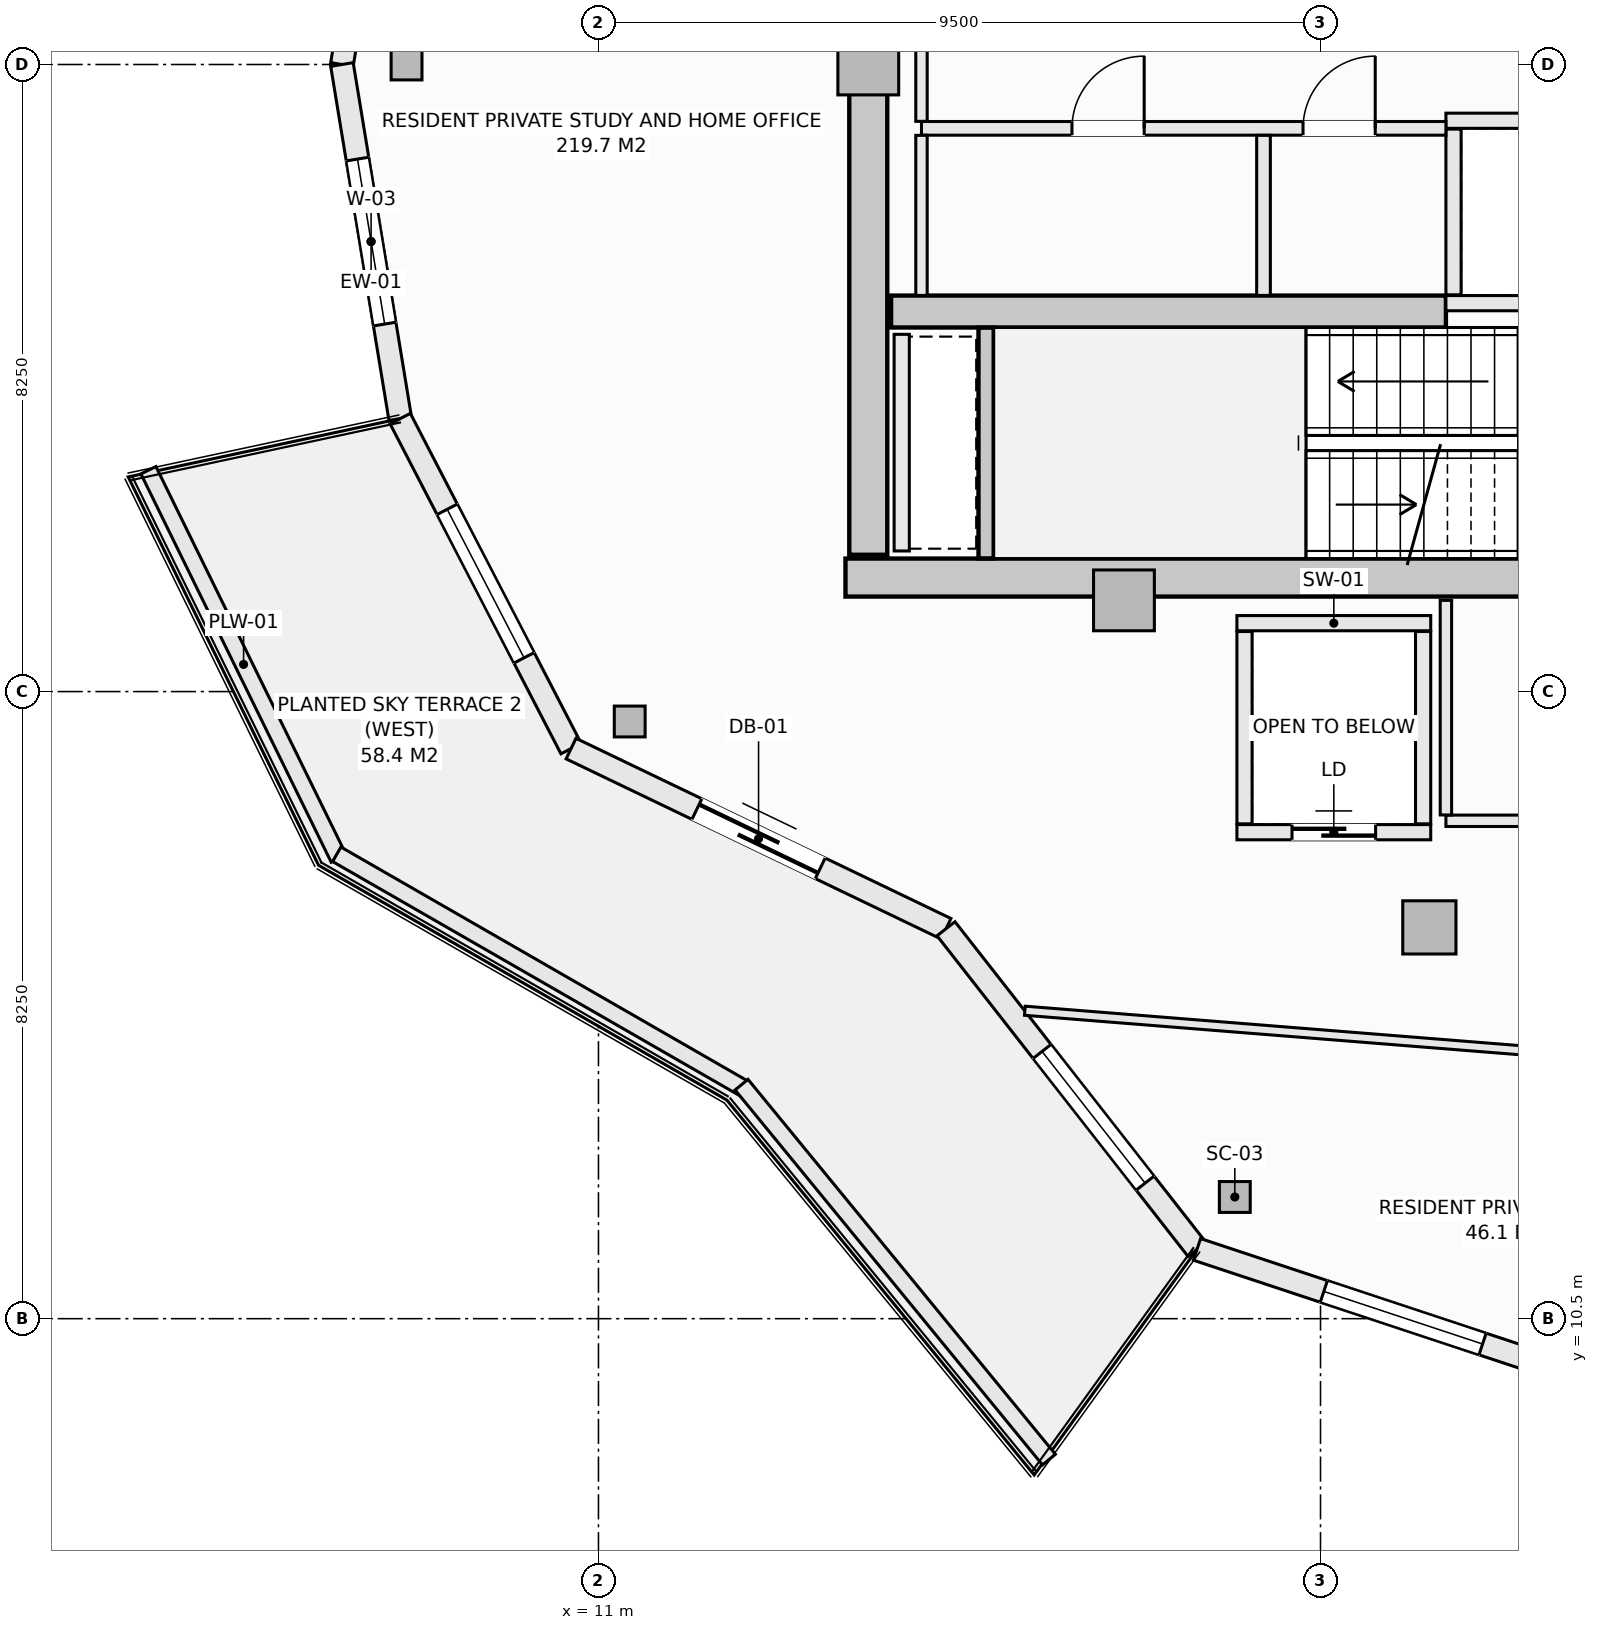
"""IFC4 building model, lengths in metres.
Left out: names, types, materials, properties, quantities, classifications, styles, units other than length and angle.
Written with IfcOpenShell. Run it as: python <this file> out.ifc"""

import sys

from ifc_helpers import new_model, si_unit, direction, frame, frame_2d, origin, origin_2d, place, context, subcontext, project, spatial, rectangle, hollow_rectangle, extrude, element, fill, save


model = new_model("IFC4")
c1 = context("Model", 3, precision=1e-05, world=origin(), true_north=direction((0.0, 1.0)))
c2 = subcontext(c1, "Body", "Model", "MODEL_VIEW")
j1 = project(units=[si_unit("LENGTHUNIT", "METRE"), si_unit("PLANEANGLEUNIT", "RADIAN")], contexts=[c1])
p1 = place(None, origin())
s1 = spatial("IfcSite", under=j1, at=p1, CompositionType="ELEMENT")
p2 = place(p1, origin())
s2 = spatial("IfcBuilding", under=s1, at=p2, CompositionType="ELEMENT")
p3 = place(p2, frame((0.0, 0.0, 239.3)))
s3 = spatial("IfcBuildingStorey", under=s2, at=p3, CompositionType="ELEMENT", Elevation=239.3)
p4 = place(p3, frame((14.25, 20.25, -0.27), z_axis=(0.0, 0.0, 1.0), x_axis=(1.0, 0.0, 0.0)))
e1 = element("IfcWall", 1, at=p4, inside=s3, PredefinedType="SHEAR", context=c2, shape_type="SweptSolid", body=[
    extrude(rectangle(XDim=13.5, YDim=0.5, at=frame_2d((6.75, 0.0))), origin(), (0.0, 0.0, 1.0), 3.3),
])
p5 = place(p3, frame((14.55, 20.55, -0.27), z_axis=(0.0, 0.0, 1.0), x_axis=(0.0, 1.0, 0.0)))
e2 = element("IfcWall", 2, at=p5, inside=s3, PredefinedType="SHEAR", context=c2, shape_type="SweptSolid", body=[
    extrude(rectangle(XDim=12.9, YDim=0.5, at=frame_2d((6.45, 0.0))), origin(), (0.0, 0.0, 1.0), 3.3),
])
p6 = place(p3, frame((14.85, 23.75, -0.27), z_axis=(0.0, 0.0, 1.0), x_axis=(1.0, 0.0, 0.0)))
e3 = element("IfcWall", 3, at=p6, inside=s3, PredefinedType="SHEAR", context=c2, shape_type="SweptSolid", body=[
    extrude(rectangle(XDim=7.3, YDim=0.42, at=frame_2d((3.65, 0.0))), origin(), (0.0, 0.0, 1.0), 3.3),
])
for number, where, z_axis, x_axis in (
    (4, (8.475, 27.0, -0.27), (0.0, 0.0, 1.0), (1.0, 0.0, 0.0)),
    (5, (11.411, 18.356, -0.27), (0.0, 0.0, 1.0), (1.0, 0.0, 0.0)),
    (6, (19.372, 12.101, -0.27), (0.0, 0.0, 1.0), (1.0, 0.0, 0.0)),
):
    element("IfcColumn", number, at=place(p3, frame(where, z_axis=z_axis, x_axis=x_axis)), inside=s3, PredefinedType="COLUMN", context=c2, shape_type="SweptSolid", body=[
        extrude(hollow_rectangle(XDim=0.406, YDim=0.406, WallThickness=0.016, at=origin_2d()), origin(), (0.0, 0.0, 1.0), 3.3),
    ])
p7 = place(p3, frame((21.932, 15.648, -0.27), z_axis=(0.0, 0.0, 1.0), x_axis=(1.0, 0.0, 0.0)))
e7 = element("IfcColumn", 7, at=p7, inside=s3, PredefinedType="COLUMN", context=c2, shape_type="SweptSolid", body=[
    extrude(rectangle(XDim=0.7, YDim=0.7, at=origin_2d()), origin(), (0.0, 0.0, 1.0), 3.3),
])
for number, where, z_axis, x_axis in (
    (8, (14.55, 27.0, -0.27), (0.0, 0.0, 1.0), (1.0, 0.0, 0.0)),
    (9, (17.914, 19.95, -0.27), (0.0, 0.0, 1.0), (1.0, 0.0, 0.0)),
):
    element("IfcColumn", number, at=place(p3, frame(where, z_axis=z_axis, x_axis=x_axis)), inside=s3, PredefinedType="PILASTER", context=c2, shape_type="SweptSolid", body=[
        extrude(rectangle(XDim=0.8, YDim=0.8, at=origin_2d()), origin(), (0.0, 0.0, 1.0), 3.3),
    ])
p8 = place(p3, frame((7.625, 27.0, 0.0), z_axis=(0.0, 0.0, 1.0), x_axis=(0.162369371657, 0.986730047758, 0.0)))
e10 = element("IfcWall", 10, at=p8, inside=s3, PredefinedType="SOLIDWALL", context=c2, shape_type="SweptSolid", body=[
    extrude(rectangle(XDim=4.721, YDim=0.3, at=frame_2d((2.361, 0.0))), origin(), (0.0, 0.0, 1.0), 2.605),
])
p9 = place(p8, frame((1.261, 0.0, 0.72)))
e11 = element("IfcOpeningElement", 11, at=p9, cuts=e10, PredefinedType="OPENING", context=c2, shape_type="SweptSolid", body=[
    extrude(rectangle(XDim=2.2, YDim=1.65, at=frame_2d((1.1, 0.825))), frame((0.0, 0.16, 0.0), z_axis=(0.0, -1.0, 0.0), x_axis=(1.0, 0.0, 0.0)), (0.0, 0.0, 1.0), 0.32),
])
p10 = place(p3, frame((7.625, 27.0, 0.0), z_axis=(0.0, 0.0, 1.0), x_axis=(0.162369371657, -0.986730047758, 0.0)))
e12 = element("IfcWall", 12, at=p10, inside=s3, PredefinedType="SOLIDWALL", context=c2, shape_type="SweptSolid", body=[
    extrude(rectangle(XDim=4.721, YDim=0.3, at=frame_2d((2.361, 0.0))), origin(), (0.0, 0.0, 1.0), 2.605),
])
p11 = place(p10, frame((1.261, 0.0, 0.72)))
e13 = element("IfcOpeningElement", 13, at=p11, cuts=e12, PredefinedType="OPENING", context=c2, shape_type="SweptSolid", body=[
    extrude(rectangle(XDim=2.2, YDim=1.65, at=frame_2d((1.1, 0.825))), frame((0.0, 0.16, 0.0), z_axis=(0.0, -1.0, 0.0), x_axis=(1.0, 0.0, 0.0)), (0.0, 0.0, 1.0), 0.32),
])
p12 = place(p3, frame((8.392, 22.341, 0.0), z_axis=(0.0, 0.0, 1.0), x_axis=(0.459793771602, -0.888025724625, 0.0)))
e14 = element("IfcWall", 14, at=p12, inside=s3, PredefinedType="SOLIDWALL", context=c2, shape_type="SweptSolid", body=[
    extrude(rectangle(XDim=4.889, YDim=0.3, at=frame_2d((2.444, 0.0))), origin(), (0.0, 0.0, 1.0), 2.605),
])
p13 = place(p12, frame((1.344, 0.0, 0.72)))
e15 = element("IfcOpeningElement", 15, at=p13, cuts=e14, PredefinedType="OPENING", context=c2, shape_type="SweptSolid", body=[
    extrude(rectangle(XDim=2.2, YDim=1.65, at=frame_2d((1.1, 0.825))), frame((0.0, 0.16, 0.0), z_axis=(0.0, -1.0, 0.0), x_axis=(1.0, 0.0, 0.0)), (0.0, 0.0, 1.0), 0.32),
])
p14 = place(p3, frame((10.639, 18.0, 0.0), z_axis=(0.0, 0.0, 1.0), x_axis=(0.901355238351, -0.433080517106, 0.0)))
e16 = element("IfcWall", 16, at=p14, inside=s3, PredefinedType="SOLIDWALL", context=c2, shape_type="SweptSolid", body=[
    extrude(rectangle(XDim=5.473, YDim=0.3, at=frame_2d((2.737, 0.0))), origin(), (0.0, 0.0, 1.0), 2.605),
])
p15 = place(p14, frame((1.837, 0.0, 0.0)))
e17 = element("IfcOpeningElement", 17, at=p15, cuts=e16, PredefinedType="OPENING", context=c2, shape_type="SweptSolid", body=[
    extrude(rectangle(XDim=1.8, YDim=2.25, at=frame_2d((0.9, 1.125))), frame((0.0, 0.16, 0.0), z_axis=(0.0, -1.0, 0.0), x_axis=(1.0, 0.0, 0.0)), (0.0, 0.0, 1.0), 0.32),
])
p16 = place(p3, frame((15.573, 15.63, 0.0), z_axis=(0.0, 0.0, 1.0), x_axis=(0.61644588519, -0.787397276241, 0.0)))
e18 = element("IfcWall", 18, at=p16, inside=s3, PredefinedType="SOLIDWALL", context=c2, shape_type="SweptSolid", body=[
    extrude(rectangle(XDim=5.357, YDim=0.3, at=frame_2d((2.678, 0.0))), origin(), (0.0, 0.0, 1.0), 2.605),
])
p17 = place(p16, frame((2.05, 0.0, 0.72)))
e19 = element("IfcOpeningElement", 19, at=p17, cuts=e18, PredefinedType="OPENING", context=c2, shape_type="SweptSolid", body=[
    extrude(rectangle(XDim=2.2, YDim=1.65, at=frame_2d((1.1, 0.825))), frame((0.0, 0.16, 0.0), z_axis=(0.0, -1.0, 0.0), x_axis=(1.0, 0.0, 0.0)), (0.0, 0.0, 1.0), 0.32),
])
p18 = place(p3, frame((18.875, 11.412, 0.0), z_axis=(0.0, 0.0, 1.0), x_axis=(0.949232769585, -0.314574552605, 0.0)))
e20 = element("IfcWall", 20, at=p18, inside=s3, PredefinedType="SOLIDWALL", context=c2, shape_type="SweptSolid", body=[
    extrude(rectangle(XDim=5.717, YDim=0.3, at=frame_2d((2.858, 0.0))), origin(), (0.0, 0.0, 1.0), 2.605),
])
p19 = place(p18, frame((1.758, 0.0, 0.72)))
e21 = element("IfcOpeningElement", 21, at=p19, cuts=e20, PredefinedType="OPENING", context=c2, shape_type="SweptSolid", body=[
    extrude(rectangle(XDim=2.2, YDim=1.65, at=frame_2d((1.1, 0.825))), frame((0.0, 0.16, 0.0), z_axis=(0.0, -1.0, 0.0), x_axis=(1.0, 0.0, 0.0)), (0.0, 0.0, 1.0), 0.32),
])
p20 = place(p3, frame((5.079, 21.662, 0.0), z_axis=(0.0, 0.0, 1.0), x_axis=(0.440058847499, -0.897968936399, 0.0)))
e22 = element("IfcWall", 22, at=p20, inside=s3, PredefinedType="PARAPET", context=c2, shape_type="SweptSolid", body=[
    extrude(rectangle(XDim=5.689, YDim=0.22, at=frame_2d((2.845, 0.0))), origin(), (0.0, 0.0, 1.0), 0.52),
])
p21 = place(p3, frame((7.557, 16.609, 0.0), z_axis=(0.0, 0.0, 1.0), x_axis=(0.866901621005, -0.49847926687, 0.0)))
e23 = element("IfcWall", 23, at=p21, inside=s3, PredefinedType="PARAPET", context=c2, shape_type="SweptSolid", body=[
    extrude(rectangle(XDim=6.197, YDim=0.22, at=frame_2d((3.098, 0.0))), origin(), (0.0, 0.0, 1.0), 0.52),
])
p22 = place(p3, frame((12.882, 13.579, 0.0), z_axis=(0.0, 0.0, 1.0), x_axis=(0.63407318032, -0.77327304492, 0.0)))
e24 = element("IfcWall", 24, at=p22, inside=s3, PredefinedType="PARAPET", context=c2, shape_type="SweptSolid", body=[
    extrude(rectangle(XDim=6.379, YDim=0.22, at=frame_2d((3.189, 0.0))), origin(), (0.0, 0.0, 1.0), 0.52),
])
p23 = place(p3, frame((16.1, 20.502, -0.27), z_axis=(0.0, 0.0, 1.0), x_axis=(0.0, 1.0, 0.0)))
e25 = element("IfcWall", 25, at=p23, inside=s3, PredefinedType="SHEAR", context=c2, shape_type="SweptSolid", body=[
    extrude(rectangle(XDim=3.036, YDim=0.2, at=frame_2d((1.518, 0.0))), origin(), (0.0, 0.0, 1.0), 3.3),
])
for number, where, z_axis, x_axis in (
    (26, (22.15, 26.26, 0.0), (0.0, 0.0, 1.0), (1.0, 0.0, 0.0)),
    (27, (22.15, 23.86, 0.0), (0.0, 0.0, 1.0), (1.0, 0.0, 0.0)),
):
    element("IfcWall", number, at=place(p3, frame(where, z_axis=z_axis, x_axis=x_axis)), inside=s3, PredefinedType="SOLIDWALL", context=c2, shape_type="SweptSolid", body=[
        extrude(rectangle(XDim=2.45, YDim=0.2, at=frame_2d((1.225, 0.0))), origin(), (0.0, 0.0, 1.0), 3.03),
    ])
p24 = place(p3, frame((22.25, 23.97, 0.0), z_axis=(0.0, 0.0, 1.0), x_axis=(0.0, 1.0, 0.0)))
e28 = element("IfcWall", 28, at=p24, inside=s3, PredefinedType="SOLIDWALL", context=c2, shape_type="SweptSolid", body=[
    extrude(rectangle(XDim=2.18, YDim=0.2, at=frame_2d((1.09, 0.0))), origin(), (0.0, 0.0, 1.0), 3.03),
])
p25 = place(p3, frame((19.4, 19.65, 0.0), z_axis=(0.0, 0.0, 1.0), x_axis=(1.0, 0.0, 0.0)))
e29 = element("IfcWall", 29, at=p25, inside=s3, PredefinedType="SOLIDWALL", context=c2, shape_type="SweptSolid", body=[
    extrude(rectangle(XDim=2.55, YDim=0.2, at=frame_2d((1.275, 0.0))), origin(), (0.0, 0.0, 1.0), 3.03),
])
p26 = place(p3, frame((19.4, 16.9, 0.0), z_axis=(0.0, 0.0, 1.0), x_axis=(1.0, 0.0, 0.0)))
e30 = element("IfcWall", 30, at=p26, inside=s3, PredefinedType="SOLIDWALL", context=c2, shape_type="SweptSolid", body=[
    extrude(rectangle(XDim=2.55, YDim=0.2, at=frame_2d((1.275, 0.0))), origin(), (0.0, 0.0, 1.0), 3.03),
])
p27 = place(p26, frame((0.725, 0.0, 0.0)))
e31 = element("IfcOpeningElement", 31, at=p27, cuts=e30, PredefinedType="OPENING", context=c2, shape_type="SweptSolid", body=[
    extrude(rectangle(XDim=1.1, YDim=2.2, at=frame_2d((0.55, 1.1))), frame((0.0, 0.11, 0.0), z_axis=(0.0, -1.0, 0.0), x_axis=(1.0, 0.0, 0.0)), (0.0, 0.0, 1.0), 0.22),
])
for number, where, z_axis, x_axis in (
    (32, (19.5, 17.01, 0.0), (0.0, 0.0, 1.0), (0.0, 1.0, 0.0)),
    (33, (21.85, 17.01, 0.0), (0.0, 0.0, 1.0), (0.0, 1.0, 0.0)),
):
    element("IfcWall", number, at=place(p3, frame(where, z_axis=z_axis, x_axis=x_axis)), inside=s3, PredefinedType="SOLIDWALL", context=c2, shape_type="SweptSolid", body=[
        extrude(rectangle(XDim=2.53, YDim=0.2, at=frame_2d((1.265, 0.0))), origin(), (0.0, 0.0, 1.0), 3.03),
    ])
p28 = place(p3, frame((14.99, 20.6, 0.0), z_axis=(0.0, 0.0, 1.0), x_axis=(0.0, 1.0, 0.0)))
e34 = element("IfcWall", 34, at=p28, inside=s3, PredefinedType="SOLIDWALL", context=c2, shape_type="SweptSolid", body=[
    extrude(rectangle(XDim=2.85, YDim=0.2, at=frame_2d((1.425, 0.0))), origin(), (0.0, 0.0, 1.0), 3.03),
])
p29 = place(p3, frame((15.25, 26.16, 0.0), z_axis=(0.0, 0.0, 1.0), x_axis=(1.0, 0.0, 0.0)))
e35 = element("IfcWall", 35, at=p29, inside=s3, PredefinedType="SOLIDWALL", context=c2, shape_type="SweptSolid", body=[
    extrude(rectangle(XDim=6.9, YDim=0.18, at=frame_2d((3.45, 0.0))), origin(), (0.0, 0.0, 1.0), 3.03),
])
p30 = place(p29, frame((5.02, 0.0, 0.0)))
e36 = element("IfcOpeningElement", 36, at=p30, cuts=e35, PredefinedType="OPENING", context=c2, shape_type="SweptSolid", body=[
    extrude(rectangle(XDim=0.95, YDim=2.1, at=frame_2d((0.475, 1.05))), frame((0.0, 0.1, 0.0), z_axis=(0.0, -1.0, 0.0), x_axis=(1.0, 0.0, 0.0)), (0.0, 0.0, 1.0), 0.2),
])
p31 = place(p29, frame((1.98, 0.0, 0.0)))
e37 = element("IfcOpeningElement", 37, at=p31, cuts=e35, PredefinedType="OPENING", context=c2, shape_type="SweptSolid", body=[
    extrude(rectangle(XDim=0.95, YDim=2.1, at=frame_2d((0.475, 1.05))), frame((0.0, 0.1, 0.0), z_axis=(0.0, -1.0, 0.0), x_axis=(1.0, 0.0, 0.0)), (0.0, 0.0, 1.0), 0.2),
])
p32 = place(p3, frame((15.25, 23.962, 0.0), z_axis=(0.0, 0.0, 1.0), x_axis=(0.0, 1.0, 0.0)))
e38 = element("IfcWall", 38, at=p32, inside=s3, PredefinedType="PARTITIONING", context=c2, shape_type="SweptSolid", body=[
    extrude(rectangle(XDim=2.106, YDim=0.15, at=frame_2d((1.053, 0.0))), origin(), (0.0, 0.0, 1.0), 3.03),
])
p33 = place(p3, frame((15.25, 26.252, 0.0), z_axis=(0.0, 0.0, 1.0), x_axis=(0.0, 1.0, 0.0)))
e39 = element("IfcWall", 39, at=p33, inside=s3, PredefinedType="PARTITIONING", context=c2, shape_type="SweptSolid", body=[
    extrude(rectangle(XDim=1.496, YDim=0.15, at=frame_2d((0.748, 0.0))), origin(), (0.0, 0.0, 1.0), 3.03),
])
p34 = place(p3, frame((19.75, 23.962, 0.0), z_axis=(0.0, 0.0, 1.0), x_axis=(0.0, 1.0, 0.0)))
e40 = element("IfcWall", 40, at=p34, inside=s3, PredefinedType="SOLIDWALL", context=c2, shape_type="SweptSolid", body=[
    extrude(rectangle(XDim=2.106, YDim=0.18, at=frame_2d((1.053, 0.0))), origin(), (0.0, 0.0, 1.0), 3.03),
])
p35 = place(p3, frame((22.15, 17.05, 0.0), z_axis=(0.0, 0.0, 1.0), x_axis=(1.0, 0.0, 0.0)))
e41 = element("IfcWall", 41, at=p35, inside=s3, PredefinedType="PARTITIONING", context=c2, shape_type="SweptSolid", body=[
    extrude(rectangle(XDim=5.0, YDim=0.15, at=frame_2d((2.5, 0.0))), origin(), (0.0, 0.0, 1.0), 3.03),
])
p36 = place(p3, frame((22.15, 17.127, 0.0), z_axis=(0.0, 0.0, 1.0), x_axis=(0.0, 1.0, 0.0)))
e42 = element("IfcWall", 42, at=p36, inside=s3, PredefinedType="PARTITIONING", context=c2, shape_type="SweptSolid", body=[
    extrude(rectangle(XDim=2.823, YDim=0.15, at=frame_2d((1.412, 0.0))), origin(), (0.0, 0.0, 1.0), 3.03),
])
p37 = place(p3, frame((16.61, 14.551, 0.0), z_axis=(0.0, 0.0, 1.0), x_axis=(0.996836469487, -0.079479891176, 0.0)))
e43 = element("IfcWall", 43, at=p37, inside=s3, PredefinedType="PARTITIONING", context=c2, shape_type="SweptSolid", body=[
    extrude(rectangle(XDim=10.496, YDim=0.12, at=frame_2d((5.248, 0.0))), origin(), (0.0, 0.0, 1.0), 3.03),
])
p38 = place(p11, origin())
e44 = element("IfcWindow", 44, at=p38, inside=s3, PartitioningType="SINGLE_PANEL", PredefinedType="WINDOW", context=c2, shape_type="SweptSolid", body=[
    extrude(rectangle(XDim=2.2, YDim=1.65, at=frame_2d((1.1, 0.825))), frame((0.0, 0.03, 0.0), z_axis=(0.0, -1.0, 0.0), x_axis=(1.0, 0.0, 0.0)), (0.0, 0.0, 1.0), 0.06),
])
fill(e13, e44)
p39 = place(p13, origin())
e45 = element("IfcWindow", 45, at=p39, inside=s3, PartitioningType="SINGLE_PANEL", PredefinedType="WINDOW", context=c2, shape_type="SweptSolid", body=[
    extrude(rectangle(XDim=2.2, YDim=1.65, at=frame_2d((1.1, 0.825))), frame((0.0, 0.03, 0.0), z_axis=(0.0, -1.0, 0.0), x_axis=(1.0, 0.0, 0.0)), (0.0, 0.0, 1.0), 0.06),
])
fill(e15, e45)
p40 = place(p15, frame((1.8, 0.0, 0.0), z_axis=(0.0, 0.0, 1.0), x_axis=(-1.0, 0.0, 0.0)))
e46 = element("IfcDoor", 46, at=p40, inside=s3, OperationType="SLIDING_TO_LEFT", PredefinedType="DOOR", context=c2, shape_type="SweptSolid", body=[
    extrude(rectangle(XDim=1.8, YDim=2.25, at=frame_2d((0.9, 1.125))), frame((0.0, 0.025, 0.0), z_axis=(0.0, -1.0, 0.0), x_axis=(1.0, 0.0, 0.0)), (0.0, 0.0, 1.0), 0.05),
])
fill(e17, e46)
p41 = place(p17, origin())
e47 = element("IfcWindow", 47, at=p41, inside=s3, PartitioningType="SINGLE_PANEL", PredefinedType="WINDOW", context=c2, shape_type="SweptSolid", body=[
    extrude(rectangle(XDim=2.2, YDim=1.65, at=frame_2d((1.1, 0.825))), frame((0.0, 0.03, 0.0), z_axis=(0.0, -1.0, 0.0), x_axis=(1.0, 0.0, 0.0)), (0.0, 0.0, 1.0), 0.06),
])
fill(e19, e47)
p42 = place(p19, origin())
e48 = element("IfcWindow", 48, at=p42, inside=s3, PartitioningType="SINGLE_PANEL", PredefinedType="WINDOW", context=c2, shape_type="SweptSolid", body=[
    extrude(rectangle(XDim=2.2, YDim=1.65, at=frame_2d((1.1, 0.825))), frame((0.0, 0.03, 0.0), z_axis=(0.0, -1.0, 0.0), x_axis=(1.0, 0.0, 0.0)), (0.0, 0.0, 1.0), 0.06),
])
fill(e21, e48)
p43 = place(p27, origin())
e49 = element("IfcDoor", 49, at=p43, inside=s3, OperationType="SLIDING_TO_LEFT", PredefinedType="DOOR", context=c2, shape_type="SweptSolid", body=[
    extrude(rectangle(XDim=1.1, YDim=2.2, at=frame_2d((0.55, 1.1))), frame((0.0, 0.025, 0.0), z_axis=(0.0, -1.0, 0.0), x_axis=(1.0, 0.0, 0.0)), (0.0, 0.0, 1.0), 0.05),
])
fill(e31, e49)
p44 = place(p30, origin())
e50 = element("IfcDoor", 50, at=p44, inside=s3, OperationType="SINGLE_SWING_RIGHT", PredefinedType="DOOR", context=c2, shape_type="SweptSolid", body=[
    extrude(rectangle(XDim=0.95, YDim=2.1, at=frame_2d((0.475, 1.05))), frame((0.0, 0.025, 0.0), z_axis=(0.0, -1.0, 0.0), x_axis=(1.0, 0.0, 0.0)), (0.0, 0.0, 1.0), 0.05),
])
fill(e36, e50)
p45 = place(p31, origin())
e51 = element("IfcDoor", 51, at=p45, inside=s3, OperationType="SINGLE_SWING_RIGHT", PredefinedType="DOOR", context=c2, shape_type="SweptSolid", body=[
    extrude(rectangle(XDim=0.95, YDim=2.1, at=frame_2d((0.475, 1.05))), frame((0.0, 0.025, 0.0), z_axis=(0.0, -1.0, 0.0), x_axis=(1.0, 0.0, 0.0)), (0.0, 0.0, 1.0), 0.05),
])
fill(e37, e51)
save(model, sys.argv[1])
